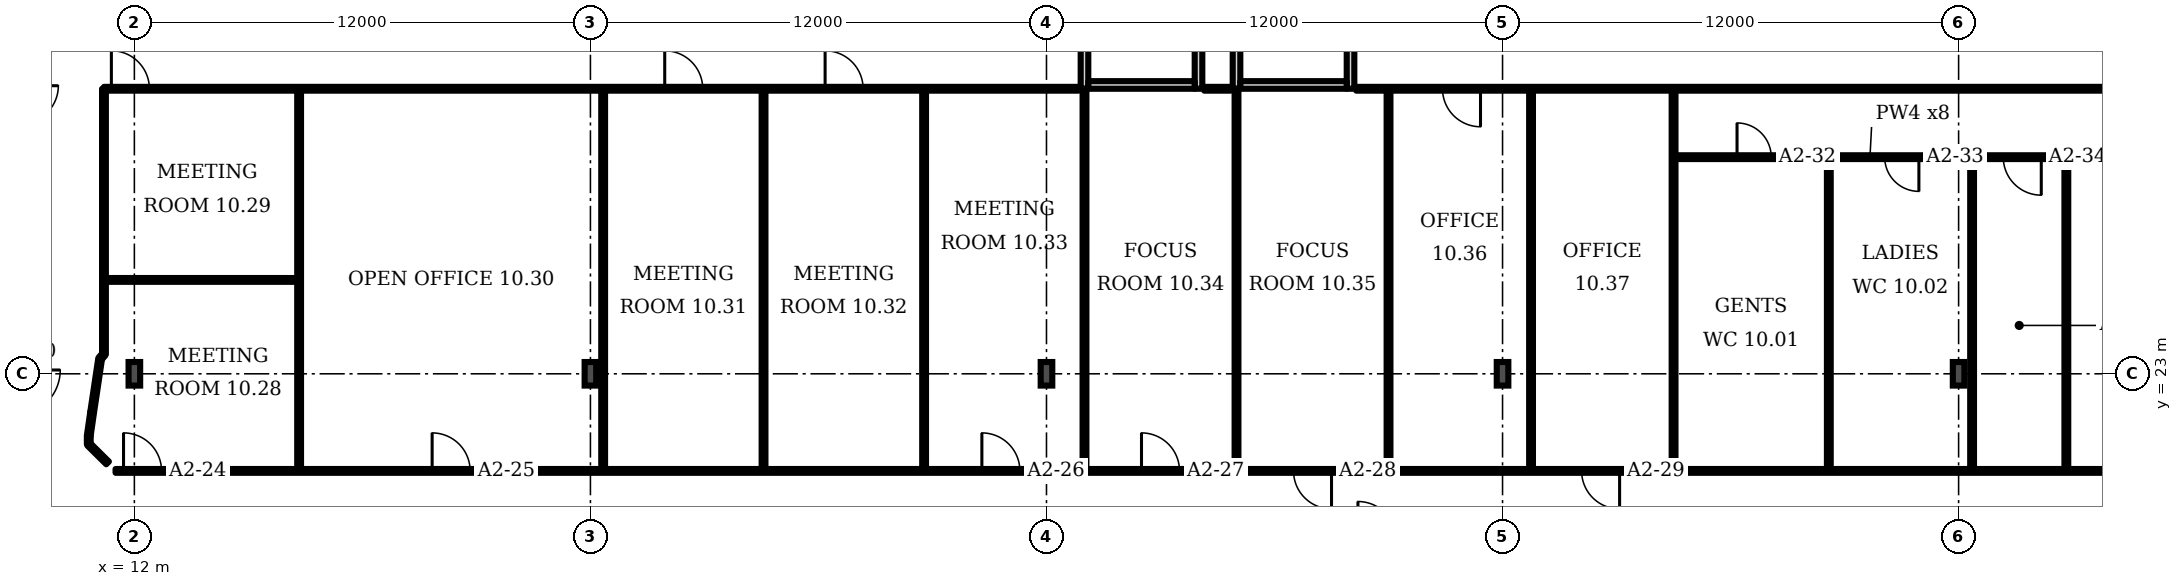
"""IFC4 building model, lengths in metres.
Left out: names, types, materials, properties, quantities, classifications, styles, units other than length and angle.
Written with IfcOpenShell. Run it as: python <this file> out.ifc"""

import sys

from ifc_helpers import new_model, si_unit, direction, frame, frame_2d, origin, origin_2d, place, context, subcontext, project, spatial, rectangle, i_section, extrude, element, fill, save


model = new_model("IFC4")
c1 = context("Model", 3, precision=1e-05, world=origin(), true_north=direction((0.0, 1.0)))
c2 = subcontext(c1, "Body", "Model", "MODEL_VIEW")
j1 = project(units=[si_unit("LENGTHUNIT", "METRE"), si_unit("PLANEANGLEUNIT", "RADIAN")], contexts=[c1])
p1 = place(None, origin())
s1 = spatial("IfcSite", under=j1, at=p1, CompositionType="ELEMENT")
p2 = place(p1, origin())
s2 = spatial("IfcBuilding", under=s1, at=p2, CompositionType="ELEMENT")
p3 = place(p2, frame((0.0, 0.0, 55.9)))
s3 = spatial("IfcBuildingStorey", under=s2, at=p3, CompositionType="ELEMENT", Elevation=55.9)
for number, where, z_axis, x_axis in (
    (1, (12.0, 23.0, 0.0), (0.0, 0.0, 1.0), (1.0, 0.0, 0.0)),
    (2, (24.0, 23.0, 0.0), (0.0, 0.0, 1.0), (1.0, 0.0, 0.0)),
    (3, (36.0, 23.0, 0.0), (0.0, 0.0, 1.0), (1.0, 0.0, 0.0)),
    (4, (48.0, 23.0, 0.0), (0.0, 0.0, 1.0), (1.0, 0.0, 0.0)),
    (5, (60.0, 23.0, 0.0), (0.0, 0.0, 1.0), (1.0, 0.0, 0.0)),
):
    element("IfcColumn", number, at=place(p3, frame(where, z_axis=z_axis, x_axis=x_axis)), inside=s3, PredefinedType="COLUMN", context=c2, shape_type="SweptSolid", body=[
        extrude(i_section(OverallWidth=0.305, OverallDepth=0.62, WebThickness=0.021, FlangeThickness=0.04, FilletRadius=0.027, at=origin_2d()), origin(), (0.0, 0.0, 1.0), 3.6),
    ])
p4 = place(p3, frame((37.0, 30.5, 0.0), z_axis=(0.0, 0.0, 1.0), x_axis=(0.0, 1.0, 0.0)))
e6 = element("IfcWall", 6, at=p4, inside=s3, PredefinedType="PARTITIONING", context=c2, shape_type="SweptSolid", body=[
    extrude(rectangle(XDim=3.5, YDim=0.2, at=frame_2d((1.75, 0.0))), origin(), (0.0, 0.0, 1.0), 3.2),
])
p5 = place(p4, frame((1.2, 0.0, 0.0)))
e7 = element("IfcOpeningElement", 7, at=p5, cuts=e6, PredefinedType="OPENING", context=c2, shape_type="SweptSolid", body=[
    extrude(rectangle(XDim=1.1, YDim=2.1, at=frame_2d((0.55, 1.05))), frame((0.0, 0.11, 0.0), z_axis=(0.0, -1.0, 0.0), x_axis=(1.0, 0.0, 0.0)), (0.0, 0.0, 1.0), 0.22),
])
p6 = place(p3, frame((40.0, 30.5, 0.0), z_axis=(0.0, 0.0, 1.0), x_axis=(0.0, 1.0, 0.0)))
e8 = element("IfcWall", 8, at=p6, inside=s3, PredefinedType="PARTITIONING", context=c2, shape_type="SweptSolid", body=[
    extrude(rectangle(XDim=3.5, YDim=0.2, at=frame_2d((1.75, 0.0))), origin(), (0.0, 0.0, 1.0), 3.2),
])
p7 = place(p3, frame((37.1, 30.6, 0.0), z_axis=(0.0, 0.0, 1.0), x_axis=(1.0, 0.0, 0.0)))
e9 = element("IfcWall", 9, at=p7, inside=s3, PredefinedType="PARTITIONING", context=c2, shape_type="SweptSolid", body=[
    extrude(rectangle(XDim=2.8, YDim=0.2, at=frame_2d((1.4, 0.0))), origin(), (0.0, 0.0, 1.0), 3.2),
])
p8 = place(p3, frame((41.0, 30.5, 0.0), z_axis=(0.0, 0.0, 1.0), x_axis=(0.0, 1.0, 0.0)))
e10 = element("IfcWall", 10, at=p8, inside=s3, PredefinedType="PARTITIONING", context=c2, shape_type="SweptSolid", body=[
    extrude(rectangle(XDim=3.5, YDim=0.2, at=frame_2d((1.75, 0.0))), origin(), (0.0, 0.0, 1.0), 3.2),
])
p9 = place(p3, frame((44.0, 30.5, 0.0), z_axis=(0.0, 0.0, 1.0), x_axis=(0.0, 1.0, 0.0)))
e11 = element("IfcWall", 11, at=p9, inside=s3, PredefinedType="PARTITIONING", context=c2, shape_type="SweptSolid", body=[
    extrude(rectangle(XDim=3.5, YDim=0.2, at=frame_2d((1.75, 0.0))), origin(), (0.0, 0.0, 1.0), 3.2),
])
p10 = place(p9, frame((1.2, 0.0, 0.0)))
e12 = element("IfcOpeningElement", 12, at=p10, cuts=e11, PredefinedType="OPENING", context=c2, shape_type="SweptSolid", body=[
    extrude(rectangle(XDim=1.1, YDim=2.1, at=frame_2d((0.55, 1.05))), frame((0.0, 0.11, 0.0), z_axis=(0.0, -1.0, 0.0), x_axis=(1.0, 0.0, 0.0)), (0.0, 0.0, 1.0), 0.22),
])
p11 = place(p3, frame((41.1, 30.6, 0.0), z_axis=(0.0, 0.0, 1.0), x_axis=(1.0, 0.0, 0.0)))
e13 = element("IfcWall", 13, at=p11, inside=s3, PredefinedType="PARTITIONING", context=c2, shape_type="SweptSolid", body=[
    extrude(rectangle(XDim=2.8, YDim=0.2, at=frame_2d((1.4, 0.0))), origin(), (0.0, 0.0, 1.0), 3.2),
])
p12 = place(p3, frame((10.8, 21.145, 0.0), z_axis=(0.0, 0.0, 1.0), x_axis=(0.0, 1.0, 0.0)))
e14 = element("IfcWall", 14, at=p12, inside=s3, PredefinedType="PARTITIONING", context=c2, shape_type="SweptSolid", body=[
    extrude(rectangle(XDim=0.225, YDim=0.1, at=frame_2d((0.113, 0.0))), origin(), (0.0, 0.0, 1.0), 3.2),
])
p13 = place(p3, frame((10.8, 21.37, 0.0), z_axis=(0.0, 0.0, 1.0), x_axis=(0.142287, 0.989823, 0.0)))
e15 = element("IfcWall", 15, at=p13, inside=s3, PredefinedType="PARTITIONING", context=c2, shape_type="SweptSolid", body=[
    extrude(rectangle(XDim=0.631, YDim=0.1, at=frame_2d((0.316, 0.0))), origin(), (0.0, 0.0, 1.0), 3.2),
])
p14 = place(p3, frame((10.89, 21.995, 0.0), z_axis=(0.0, 0.0, 1.0), x_axis=(0.147988, 0.988993, 0.0)))
e16 = element("IfcWall", 16, at=p14, inside=s3, PredefinedType="PARTITIONING", context=c2, shape_type="SweptSolid", body=[
    extrude(rectangle(XDim=1.42, YDim=0.1, at=frame_2d((0.71, 0.0))), origin(), (0.0, 0.0, 1.0), 3.2),
])
p15 = place(p3, frame((11.1, 23.4, 0.0), z_axis=(0.0, 0.0, 1.0), x_axis=(0.65566, 0.755051, 0.0)))
e17 = element("IfcWall", 17, at=p15, inside=s3, PredefinedType="PARTITIONING", context=c2, shape_type="SweptSolid", body=[
    extrude(rectangle(XDim=0.152, YDim=0.1, at=frame_2d((0.076, 0.0))), origin(), (0.0, 0.0, 1.0), 3.2),
])
p16 = place(p3, frame((11.2, 23.515, 0.0), z_axis=(0.0, 0.0, 1.0), x_axis=(0.0, 1.0, 0.0)))
e18 = element("IfcWall", 18, at=p16, inside=s3, PredefinedType="PARTITIONING", context=c2, shape_type="SweptSolid", body=[
    extrude(rectangle(XDim=6.985, YDim=0.1, at=frame_2d((3.493, 0.0))), origin(), (0.0, 0.0, 1.0), 3.2),
])
p17 = place(p3, frame((11.2, 25.47, 0.0), z_axis=(0.0, 0.0, 1.0), x_axis=(1.0, 0.0, 0.0)))
e19 = element("IfcWall", 19, at=p17, inside=s3, PredefinedType="PARTITIONING", context=c2, shape_type="SweptSolid", body=[
    extrude(rectangle(XDim=5.135, YDim=0.1, at=frame_2d((2.567, 0.0))), origin(), (0.0, 0.0, 1.0), 3.2),
])
p18 = place(p3, frame((11.2, 30.5, 0.0), z_axis=(0.0, 0.0, 1.0), x_axis=(1.0, 0.0, 0.0)))
e20 = element("IfcWall", 20, at=p18, inside=s3, PredefinedType="PARTITIONING", context=c2, shape_type="SweptSolid", body=[
    extrude(rectangle(XDim=25.65, YDim=0.1, at=frame_2d((12.825, 0.0))), origin(), (0.0, 0.0, 1.0), 3.2),
])
p19 = place(p18, frame((0.195, 0.0, 0.0)))
e21 = element("IfcOpeningElement", 21, at=p19, cuts=e20, PredefinedType="OPENING", context=c2, shape_type="SweptSolid", body=[
    extrude(rectangle(XDim=1.0, YDim=2.1, at=frame_2d((0.5, 1.05))), frame((0.0, 0.06, 0.0), z_axis=(0.0, -1.0, 0.0), x_axis=(1.0, 0.0, 0.0)), (0.0, 0.0, 1.0), 0.12),
])
p20 = place(p18, frame((14.755, 0.0, 0.0)))
e22 = element("IfcOpeningElement", 22, at=p20, cuts=e20, PredefinedType="OPENING", context=c2, shape_type="SweptSolid", body=[
    extrude(rectangle(XDim=1.0, YDim=2.1, at=frame_2d((0.5, 1.05))), frame((0.0, 0.06, 0.0), z_axis=(0.0, -1.0, 0.0), x_axis=(1.0, 0.0, 0.0)), (0.0, 0.0, 1.0), 0.12),
])
p21 = place(p18, frame((18.975, 0.0, 0.0)))
e23 = element("IfcOpeningElement", 23, at=p21, cuts=e20, PredefinedType="OPENING", context=c2, shape_type="SweptSolid", body=[
    extrude(rectangle(XDim=1.0, YDim=2.1, at=frame_2d((0.5, 1.05))), frame((0.0, 0.06, 0.0), z_axis=(0.0, -1.0, 0.0), x_axis=(1.0, 0.0, 0.0)), (0.0, 0.0, 1.0), 0.12),
])
p22 = place(p3, frame((11.295, 20.655, 0.0), z_axis=(0.0, 0.0, 1.0), x_axis=(-0.7106, 0.703589, 0.0)))
e24 = element("IfcWall", 24, at=p22, inside=s3, PredefinedType="PARTITIONING", context=c2, shape_type="SweptSolid", body=[
    extrude(rectangle(XDim=0.697, YDim=0.1, at=frame_2d((0.348, 0.0))), origin(), (0.0, 0.0, 1.0), 3.2),
])
p23 = place(p3, frame((11.505, 20.445, 0.0), z_axis=(0.0, 0.0, 1.0), x_axis=(1.0, 0.0, 0.0)))
e25 = element("IfcWall", 25, at=p23, inside=s3, PredefinedType="PARTITIONING", context=c2, shape_type="SweptSolid", body=[
    extrude(rectangle(XDim=58.82, YDim=0.1, at=frame_2d((29.41, 0.0))), origin(), (0.0, 0.0, 1.0), 3.2),
])
p24 = place(p23, frame((0.21, 0.0, 0.0)))
e26 = element("IfcOpeningElement", 26, at=p24, cuts=e25, PredefinedType="OPENING", context=c2, shape_type="SweptSolid", body=[
    extrude(rectangle(XDim=1.0, YDim=2.1, at=frame_2d((0.5, 1.05))), frame((0.0, 0.06, 0.0), z_axis=(0.0, -1.0, 0.0), x_axis=(1.0, 0.0, 0.0)), (0.0, 0.0, 1.0), 0.12),
])
p25 = place(p23, frame((8.33, 0.0, 0.0)))
e27 = element("IfcOpeningElement", 27, at=p25, cuts=e25, PredefinedType="OPENING", context=c2, shape_type="SweptSolid", body=[
    extrude(rectangle(XDim=1.0, YDim=2.1, at=frame_2d((0.5, 1.05))), frame((0.0, 0.06, 0.0), z_axis=(0.0, -1.0, 0.0), x_axis=(1.0, 0.0, 0.0)), (0.0, 0.0, 1.0), 0.12),
])
p26 = place(p23, frame((22.795, 0.0, 0.0)))
e28 = element("IfcOpeningElement", 28, at=p26, cuts=e25, PredefinedType="OPENING", context=c2, shape_type="SweptSolid", body=[
    extrude(rectangle(XDim=1.0, YDim=2.1, at=frame_2d((0.5, 1.05))), frame((0.0, 0.06, 0.0), z_axis=(0.0, -1.0, 0.0), x_axis=(1.0, 0.0, 0.0)), (0.0, 0.0, 1.0), 0.12),
])
p27 = place(p23, frame((26.995, 0.0, 0.0)))
e29 = element("IfcOpeningElement", 29, at=p27, cuts=e25, PredefinedType="OPENING", context=c2, shape_type="SweptSolid", body=[
    extrude(rectangle(XDim=1.0, YDim=2.1, at=frame_2d((0.5, 1.05))), frame((0.0, 0.06, 0.0), z_axis=(0.0, -1.0, 0.0), x_axis=(1.0, 0.0, 0.0)), (0.0, 0.0, 1.0), 0.12),
])
p28 = place(p23, frame((30.995, 0.0, 0.0)))
e30 = element("IfcOpeningElement", 30, at=p28, cuts=e25, PredefinedType="OPENING", context=c2, shape_type="SweptSolid", body=[
    extrude(rectangle(XDim=1.0, YDim=2.1, at=frame_2d((0.5, 1.05))), frame((0.0, 0.06, 0.0), z_axis=(0.0, -1.0, 0.0), x_axis=(1.0, 0.0, 0.0)), (0.0, 0.0, 1.0), 0.12),
])
p29 = place(p23, frame((38.575, 0.0, 0.0)))
e31 = element("IfcOpeningElement", 31, at=p29, cuts=e25, PredefinedType="OPENING", context=c2, shape_type="SweptSolid", body=[
    extrude(rectangle(XDim=1.0, YDim=2.1, at=frame_2d((0.5, 1.05))), frame((0.0, 0.06, 0.0), z_axis=(0.0, -1.0, 0.0), x_axis=(1.0, 0.0, 0.0)), (0.0, 0.0, 1.0), 0.12),
])
p30 = place(p23, frame((54.12, 0.0, 0.0)))
e32 = element("IfcOpeningElement", 32, at=p30, cuts=e25, PredefinedType="OPENING", context=c2, shape_type="SweptSolid", body=[
    extrude(rectangle(XDim=1.8, YDim=2.1, at=frame_2d((0.9, 1.05))), frame((0.0, 0.06, 0.0), z_axis=(0.0, -1.0, 0.0), x_axis=(1.0, 0.0, 0.0)), (0.0, 0.0, 1.0), 0.12),
])
for number, where, z_axis, x_axis in (
    (33, (16.335, 20.445, 0.0), (0.0, 0.0, 1.0), (0.0, 1.0, 0.0)),
    (34, (24.335, 20.445, 0.0), (0.0, 0.0, 1.0), (0.0, 1.0, 0.0)),
    (35, (28.555, 20.445, 0.0), (0.0, 0.0, 1.0), (0.0, 1.0, 0.0)),
    (36, (32.78, 20.445, 0.0), (0.0, 0.0, 1.0), (0.0, 1.0, 0.0)),
    (37, (37.0, 20.445, 0.0), (0.0, 0.0, 1.0), (0.0, 1.0, 0.0)),
    (38, (41.0, 20.445, 0.0), (0.0, 0.0, 1.0), (0.0, 1.0, 0.0)),
    (39, (45.0, 20.445, 0.0), (0.0, 0.0, 1.0), (0.0, 1.0, 0.0)),
    (40, (48.75, 20.445, 0.0), (0.0, 0.0, 1.0), (0.0, 1.0, 0.0)),
):
    element("IfcWall", number, at=place(p3, frame(where, z_axis=z_axis, x_axis=x_axis)), inside=s3, PredefinedType="PARTITIONING", context=c2, shape_type="SweptSolid", body=[
        extrude(rectangle(XDim=10.055, YDim=0.1, at=frame_2d((5.027, 0.0))), origin(), (0.0, 0.0, 1.0), 3.2),
    ])
p31 = place(p3, frame((52.5, 20.445, 0.0), z_axis=(0.0, 0.0, 1.0), x_axis=(0.0, 1.0, 0.0)))
e41 = element("IfcWall", 41, at=p31, inside=s3, PredefinedType="PARTITIONING", context=c2, shape_type="SweptSolid", body=[
    extrude(rectangle(XDim=10.045, YDim=0.1, at=frame_2d((5.022, 0.0))), origin(), (0.0, 0.0, 1.0), 3.2),
])
p32 = place(p3, frame((52.5, 28.7, 0.0), z_axis=(0.0, 0.0, 1.0), x_axis=(1.0, 0.0, 0.0)))
e42 = element("IfcWall", 42, at=p32, inside=s3, PredefinedType="PARTITIONING", context=c2, shape_type="SweptSolid", body=[
    extrude(rectangle(XDim=10.335, YDim=0.1, at=frame_2d((5.167, 0.0))), origin(), (0.0, 0.0, 1.0), 3.2),
])
p33 = place(p32, frame((1.67, 0.0, 0.0)))
e43 = element("IfcOpeningElement", 43, at=p33, cuts=e42, PredefinedType="OPENING", context=c2, shape_type="SweptSolid", body=[
    extrude(rectangle(XDim=0.9, YDim=2.1, at=frame_2d((0.45, 1.05))), frame((0.0, 0.06, 0.0), z_axis=(0.0, -1.0, 0.0), x_axis=(1.0, 0.0, 0.0)), (0.0, 0.0, 1.0), 0.12),
])
p34 = place(p32, frame((5.555, 0.0, 0.0)))
e44 = element("IfcOpeningElement", 44, at=p34, cuts=e42, PredefinedType="OPENING", context=c2, shape_type="SweptSolid", body=[
    extrude(rectangle(XDim=0.9, YDim=2.1, at=frame_2d((0.45, 1.05))), frame((0.0, 0.06, 0.0), z_axis=(0.0, -1.0, 0.0), x_axis=(1.0, 0.0, 0.0)), (0.0, 0.0, 1.0), 0.12),
])
p35 = place(p32, frame((8.675, 0.0, 0.0)))
e45 = element("IfcOpeningElement", 45, at=p35, cuts=e42, PredefinedType="OPENING", context=c2, shape_type="SweptSolid", body=[
    extrude(rectangle(XDim=1.0, YDim=2.1, at=frame_2d((0.5, 1.05))), frame((0.0, 0.06, 0.0), z_axis=(0.0, -1.0, 0.0), x_axis=(1.0, 0.0, 0.0)), (0.0, 0.0, 1.0), 0.12),
])
for number, where, z_axis, x_axis in (
    (46, (56.585, 20.445, 0.0), (0.0, 0.0, 1.0), (0.0, 1.0, 0.0)),
    (47, (60.355, 20.445, 0.0), (0.0, 0.0, 1.0), (0.0, 1.0, 0.0)),
    (48, (62.835, 20.445, 0.0), (0.0, 0.0, 1.0), (0.0, 1.0, 0.0)),
):
    element("IfcWall", number, at=place(p3, frame(where, z_axis=z_axis, x_axis=x_axis)), inside=s3, PredefinedType="PARTITIONING", context=c2, shape_type="SweptSolid", body=[
        extrude(rectangle(XDim=8.255, YDim=0.1, at=frame_2d((4.127, 0.0))), origin(), (0.0, 0.0, 1.0), 3.2),
    ])
p36 = place(p3, frame((40.15, 30.5, 0.0), z_axis=(0.0, 0.0, 1.0), x_axis=(1.0, 0.0, 0.0)))
e49 = element("IfcWall", 49, at=p36, inside=s3, PredefinedType="PARTITIONING", context=c2, shape_type="SweptSolid", body=[
    extrude(rectangle(XDim=0.7, YDim=0.1, at=frame_2d((0.35, 0.0))), origin(), (0.0, 0.0, 1.0), 3.2),
])
p37 = place(p3, frame((44.15, 30.5, 0.0), z_axis=(0.0, 0.0, 1.0), x_axis=(1.0, 0.0, 0.0)))
e50 = element("IfcWall", 50, at=p37, inside=s3, PredefinedType="PARTITIONING", context=c2, shape_type="SweptSolid", body=[
    extrude(rectangle(XDim=20.85, YDim=0.1, at=frame_2d((10.425, 0.0))), origin(), (0.0, 0.0, 1.0), 3.2),
])
p38 = place(p37, frame((2.27, 0.0, 0.0)))
e51 = element("IfcOpeningElement", 51, at=p38, cuts=e50, PredefinedType="OPENING", context=c2, shape_type="SweptSolid", body=[
    extrude(rectangle(XDim=1.0, YDim=2.1, at=frame_2d((0.5, 1.05))), frame((0.0, 0.06, 0.0), z_axis=(0.0, -1.0, 0.0), x_axis=(1.0, 0.0, 0.0)), (0.0, 0.0, 1.0), 0.12),
])
p39 = place(p24, origin())
e52 = element("IfcDoor", 52, at=p39, inside=s3, OperationType="SINGLE_SWING_LEFT", PredefinedType="DOOR", context=c2, shape_type="SweptSolid", body=[
    extrude(rectangle(XDim=1.0, YDim=2.1, at=frame_2d((0.5, 1.05))), frame((0.0, 0.025, 0.0), z_axis=(0.0, -1.0, 0.0), x_axis=(1.0, 0.0, 0.0)), (0.0, 0.0, 1.0), 0.05),
])
fill(e26, e52)
p40 = place(p25, origin())
e53 = element("IfcDoor", 53, at=p40, inside=s3, OperationType="SINGLE_SWING_LEFT", PredefinedType="DOOR", context=c2, shape_type="SweptSolid", body=[
    extrude(rectangle(XDim=1.0, YDim=2.1, at=frame_2d((0.5, 1.05))), frame((0.0, 0.025, 0.0), z_axis=(0.0, -1.0, 0.0), x_axis=(1.0, 0.0, 0.0)), (0.0, 0.0, 1.0), 0.05),
])
fill(e27, e53)
p41 = place(p26, origin())
e54 = element("IfcDoor", 54, at=p41, inside=s3, OperationType="SINGLE_SWING_LEFT", PredefinedType="DOOR", context=c2, shape_type="SweptSolid", body=[
    extrude(rectangle(XDim=1.0, YDim=2.1, at=frame_2d((0.5, 1.05))), frame((0.0, 0.025, 0.0), z_axis=(0.0, -1.0, 0.0), x_axis=(1.0, 0.0, 0.0)), (0.0, 0.0, 1.0), 0.05),
])
fill(e28, e54)
p42 = place(p27, origin())
e55 = element("IfcDoor", 55, at=p42, inside=s3, OperationType="SINGLE_SWING_LEFT", PredefinedType="DOOR", context=c2, shape_type="SweptSolid", body=[
    extrude(rectangle(XDim=1.0, YDim=2.1, at=frame_2d((0.5, 1.05))), frame((0.0, 0.025, 0.0), z_axis=(0.0, -1.0, 0.0), x_axis=(1.0, 0.0, 0.0)), (0.0, 0.0, 1.0), 0.05),
])
fill(e29, e55)
p43 = place(p28, origin())
e56 = element("IfcDoor", 56, at=p43, inside=s3, OperationType="SINGLE_SWING_RIGHT", PredefinedType="DOOR", context=c2, shape_type="SweptSolid", body=[
    extrude(rectangle(XDim=1.0, YDim=2.1, at=frame_2d((0.5, 1.05))), frame((0.0, 0.025, 0.0), z_axis=(0.0, -1.0, 0.0), x_axis=(1.0, 0.0, 0.0)), (0.0, 0.0, 1.0), 0.05),
])
fill(e30, e56)
p44 = place(p29, origin())
e57 = element("IfcDoor", 57, at=p44, inside=s3, OperationType="SINGLE_SWING_RIGHT", PredefinedType="DOOR", context=c2, shape_type="SweptSolid", body=[
    extrude(rectangle(XDim=1.0, YDim=2.1, at=frame_2d((0.5, 1.05))), frame((0.0, 0.025, 0.0), z_axis=(0.0, -1.0, 0.0), x_axis=(1.0, 0.0, 0.0)), (0.0, 0.0, 1.0), 0.05),
])
fill(e31, e57)
p45 = place(p33, origin())
e58 = element("IfcDoor", 58, at=p45, inside=s3, OperationType="SINGLE_SWING_LEFT", PredefinedType="DOOR", context=c2, shape_type="SweptSolid", body=[
    extrude(rectangle(XDim=0.9, YDim=2.1, at=frame_2d((0.45, 1.05))), frame((0.0, 0.025, 0.0), z_axis=(0.0, -1.0, 0.0), x_axis=(1.0, 0.0, 0.0)), (0.0, 0.0, 1.0), 0.05),
])
fill(e43, e58)
p46 = place(p34, origin())
e59 = element("IfcDoor", 59, at=p46, inside=s3, OperationType="SINGLE_SWING_RIGHT", PredefinedType="DOOR", context=c2, shape_type="SweptSolid", body=[
    extrude(rectangle(XDim=0.9, YDim=2.1, at=frame_2d((0.45, 1.05))), frame((0.0, 0.025, 0.0), z_axis=(0.0, -1.0, 0.0), x_axis=(1.0, 0.0, 0.0)), (0.0, 0.0, 1.0), 0.05),
])
fill(e44, e59)
p47 = place(p35, origin())
e60 = element("IfcDoor", 60, at=p47, inside=s3, OperationType="SINGLE_SWING_RIGHT", PredefinedType="DOOR", context=c2, shape_type="SweptSolid", body=[
    extrude(rectangle(XDim=1.0, YDim=2.1, at=frame_2d((0.5, 1.05))), frame((0.0, 0.025, 0.0), z_axis=(0.0, -1.0, 0.0), x_axis=(1.0, 0.0, 0.0)), (0.0, 0.0, 1.0), 0.05),
])
fill(e45, e60)
p48 = place(p19, origin())
e61 = element("IfcDoor", 61, at=p48, inside=s3, OperationType="SINGLE_SWING_LEFT", PredefinedType="DOOR", context=c2, shape_type="SweptSolid", body=[
    extrude(rectangle(XDim=1.0, YDim=2.1, at=frame_2d((0.5, 1.05))), frame((0.0, 0.025, 0.0), z_axis=(0.0, -1.0, 0.0), x_axis=(1.0, 0.0, 0.0)), (0.0, 0.0, 1.0), 0.05),
])
fill(e21, e61)
p49 = place(p20, origin())
e62 = element("IfcDoor", 62, at=p49, inside=s3, OperationType="SINGLE_SWING_LEFT", PredefinedType="DOOR", context=c2, shape_type="SweptSolid", body=[
    extrude(rectangle(XDim=1.0, YDim=2.1, at=frame_2d((0.5, 1.05))), frame((0.0, 0.025, 0.0), z_axis=(0.0, -1.0, 0.0), x_axis=(1.0, 0.0, 0.0)), (0.0, 0.0, 1.0), 0.05),
])
fill(e22, e62)
p50 = place(p21, origin())
e63 = element("IfcDoor", 63, at=p50, inside=s3, OperationType="SINGLE_SWING_LEFT", PredefinedType="DOOR", context=c2, shape_type="SweptSolid", body=[
    extrude(rectangle(XDim=1.0, YDim=2.1, at=frame_2d((0.5, 1.05))), frame((0.0, 0.025, 0.0), z_axis=(0.0, -1.0, 0.0), x_axis=(1.0, 0.0, 0.0)), (0.0, 0.0, 1.0), 0.05),
])
fill(e23, e63)
p51 = place(p38, origin())
e64 = element("IfcDoor", 64, at=p51, inside=s3, OperationType="SINGLE_SWING_RIGHT", PredefinedType="DOOR", context=c2, shape_type="SweptSolid", body=[
    extrude(rectangle(XDim=1.0, YDim=2.1, at=frame_2d((0.5, 1.05))), frame((0.0, 0.025, 0.0), z_axis=(0.0, -1.0, 0.0), x_axis=(1.0, 0.0, 0.0)), (0.0, 0.0, 1.0), 0.05),
])
fill(e51, e64)
save(model, sys.argv[1])
